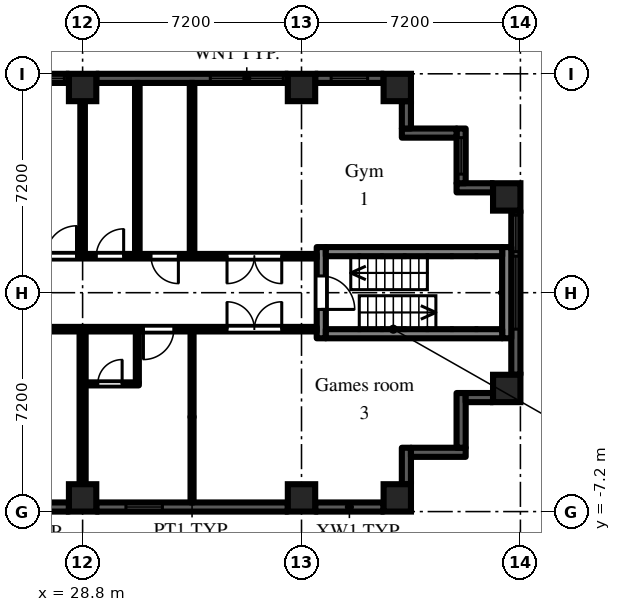
"""IFC4 building model, lengths in metres.
Left out: names, types, materials, properties, quantities, classifications, styles, units other than length and angle.
Written with IfcOpenShell. Run it as: python <this file> out.ifc"""

import sys

from ifc_helpers import new_model, si_unit, direction, frame, frame_2d, origin, origin_2d, place, context, subcontext, project, spatial, rectangle, extrude, element, fill, save


model = new_model("IFC4")
c1 = context("Model", 3, precision=1e-05, world=origin(), true_north=direction((0.0, 1.0)))
c2 = subcontext(c1, "Body", "Model", "MODEL_VIEW")
j1 = project(units=[si_unit("LENGTHUNIT", "METRE"), si_unit("PLANEANGLEUNIT", "RADIAN")], contexts=[c1])
p1 = place(None, origin())
s1 = spatial("IfcSite", under=j1, at=p1, CompositionType="ELEMENT")
p2 = place(p1, origin())
s2 = spatial("IfcBuilding", under=s1, at=p2, CompositionType="ELEMENT")
p3 = place(p2, frame((0.0, 0.0, 59.7)))
s3 = spatial("IfcBuildingStorey", under=s2, at=p3, CompositionType="ELEMENT", Elevation=59.7)
for number, where, z_axis, x_axis in (
    (1, (28.8, -6.75, 0.0), (0.0, 0.0, 1.0), (1.0, 0.0, 0.0)),
    (2, (28.8, 6.75, 0.0), (0.0, 0.0, 1.0), (1.0, 0.0, 0.0)),
    (3, (36.0, -6.75, 0.0), (0.0, 0.0, 1.0), (1.0, 0.0, 0.0)),
    (4, (36.0, 6.75, 0.0), (0.0, 0.0, 1.0), (1.0, 0.0, 0.0)),
    (5, (39.15, -6.75, 0.0), (0.0, 0.0, 1.0), (1.0, 0.0, 0.0)),
    (6, (39.15, 6.75, 0.0), (0.0, 0.0, 1.0), (1.0, 0.0, 0.0)),
    (7, (42.75, -3.15, 0.0), (0.0, 0.0, 1.0), (1.0, 0.0, 0.0)),
    (8, (42.75, 3.15, 0.0), (0.0, 0.0, 1.0), (1.0, 0.0, 0.0)),
):
    element("IfcColumn", number, at=place(p3, frame(where, z_axis=z_axis, x_axis=x_axis)), inside=s3, PredefinedType="COLUMN", context=c2, shape_type="SweptSolid", body=[
        extrude(rectangle(XDim=0.9, YDim=0.9, at=origin_2d()), origin(), (0.0, 0.0, 1.0), 3.0),
    ])
p4 = place(p3, frame((25.2, -7.05, 0.0), z_axis=(0.0, 0.0, 1.0), x_axis=(1.0, 0.0, 0.0)))
e9 = element("IfcWall", 9, at=p4, inside=s3, PredefinedType="SOLIDWALL", context=c2, shape_type="SweptSolid", body=[
    extrude(rectangle(XDim=3.15, YDim=0.3, at=frame_2d((1.575, 0.0))), origin(), (0.0, 0.0, 1.0), 2.1),
])
p5 = place(p4, frame((0.975, 0.0, 0.2)))
e10 = element("IfcOpeningElement", 10, at=p5, cuts=e9, PredefinedType="OPENING", context=c2, shape_type="SweptSolid", body=[
    extrude(rectangle(XDim=1.2, YDim=1.85, at=frame_2d((0.6, 0.925))), frame((0.0, 0.16, 0.0), z_axis=(0.0, -1.0, 0.0), x_axis=(1.0, 0.0, 0.0)), (0.0, 0.0, 1.0), 0.32),
])
p6 = place(p3, frame((29.25, -7.05, 0.0), z_axis=(0.0, 0.0, 1.0), x_axis=(1.0, 0.0, 0.0)))
e11 = element("IfcWall", 11, at=p6, inside=s3, PredefinedType="SOLIDWALL", context=c2, shape_type="SweptSolid", body=[
    extrude(rectangle(XDim=6.3, YDim=0.3, at=frame_2d((3.15, 0.0))), origin(), (0.0, 0.0, 1.0), 2.1),
])
p7 = place(p6, frame((0.975, 0.0, 0.2)))
e12 = element("IfcOpeningElement", 12, at=p7, cuts=e11, PredefinedType="OPENING", context=c2, shape_type="SweptSolid", body=[
    extrude(rectangle(XDim=1.2, YDim=1.85, at=frame_2d((0.6, 0.925))), frame((0.0, 0.16, 0.0), z_axis=(0.0, -1.0, 0.0), x_axis=(1.0, 0.0, 0.0)), (0.0, 0.0, 1.0), 0.32),
])
p8 = place(p3, frame((36.45, -7.05, 0.0), z_axis=(0.0, 0.0, 1.0), x_axis=(1.0, 0.0, 0.0)))
e13 = element("IfcWall", 13, at=p8, inside=s3, PredefinedType="SOLIDWALL", context=c2, shape_type="SweptSolid", body=[
    extrude(rectangle(XDim=2.25, YDim=0.3, at=frame_2d((1.125, 0.0))), origin(), (0.0, 0.0, 1.0), 2.1),
])
p9 = place(p3, frame((39.45, -6.3, 0.0), z_axis=(0.0, 0.0, 1.0), x_axis=(0.0, 1.0, 0.0)))
e14 = element("IfcWall", 14, at=p9, inside=s3, PredefinedType="SOLIDWALL", context=c2, shape_type="SweptSolid", body=[
    extrude(rectangle(XDim=1.2, YDim=0.3, at=frame_2d((0.6, 0.0))), origin(), (0.0, 0.0, 1.0), 2.55),
])
p10 = place(p3, frame((39.6, -5.25, 0.0), z_axis=(0.0, 0.0, 1.0), x_axis=(1.0, 0.0, 0.0)))
e15 = element("IfcWall", 15, at=p10, inside=s3, PredefinedType="SOLIDWALL", context=c2, shape_type="SweptSolid", body=[
    extrude(rectangle(XDim=1.8, YDim=0.3, at=frame_2d((0.9, 0.0))), origin(), (0.0, 0.0, 1.0), 2.55),
])
p11 = place(p3, frame((41.25, -5.1, 0.0), z_axis=(0.0, 0.0, 1.0), x_axis=(0.0, 1.0, 0.0)))
e16 = element("IfcWall", 16, at=p11, inside=s3, PredefinedType="SOLIDWALL", context=c2, shape_type="SweptSolid", body=[
    extrude(rectangle(XDim=1.8, YDim=0.3, at=frame_2d((0.9, 0.0))), origin(), (0.0, 0.0, 1.0), 2.55),
])
p12 = place(p3, frame((41.4, -3.45, 0.0), z_axis=(0.0, 0.0, 1.0), x_axis=(1.0, 0.0, 0.0)))
e17 = element("IfcWall", 17, at=p12, inside=s3, PredefinedType="SOLIDWALL", context=c2, shape_type="SweptSolid", body=[
    extrude(rectangle(XDim=0.9, YDim=0.3, at=frame_2d((0.45, 0.0))), origin(), (0.0, 0.0, 1.0), 2.55),
])
p13 = place(p3, frame((43.05, -2.7, 0.0), z_axis=(0.0, 0.0, 1.0), x_axis=(0.0, 1.0, 0.0)))
e18 = element("IfcWall", 18, at=p13, inside=s3, PredefinedType="SOLIDWALL", context=c2, shape_type="SweptSolid", body=[
    extrude(rectangle(XDim=5.4, YDim=0.3, at=frame_2d((2.7, 0.0))), origin(), (0.0, 0.0, 1.0), 2.1),
])
p14 = place(p13, frame((1.5, 0.0, 0.2)))
e19 = element("IfcOpeningElement", 19, at=p14, cuts=e18, PredefinedType="OPENING", context=c2, shape_type="SweptSolid", body=[
    extrude(rectangle(XDim=2.4, YDim=1.85, at=frame_2d((1.2, 0.925))), frame((0.0, 0.16, 0.0), z_axis=(0.0, -1.0, 0.0), x_axis=(1.0, 0.0, 0.0)), (0.0, 0.0, 1.0), 0.32),
])
p15 = place(p13, frame((4.05, 0.0, 0.2)))
e20 = element("IfcOpeningElement", 20, at=p15, cuts=e18, PredefinedType="OPENING", context=c2, shape_type="SweptSolid", body=[
    extrude(rectangle(XDim=1.2, YDim=1.85, at=frame_2d((0.6, 0.925))), frame((0.0, 0.16, 0.0), z_axis=(0.0, -1.0, 0.0), x_axis=(1.0, 0.0, 0.0)), (0.0, 0.0, 1.0), 0.32),
])
p16 = place(p3, frame((42.3, 3.45, 0.0), z_axis=(0.0, 0.0, 1.0), x_axis=(-1.0, 0.0, 0.0)))
e21 = element("IfcWall", 21, at=p16, inside=s3, PredefinedType="SOLIDWALL", context=c2, shape_type="SweptSolid", body=[
    extrude(rectangle(XDim=1.2, YDim=0.3, at=frame_2d((0.6, 0.0))), origin(), (0.0, 0.0, 1.0), 2.55),
])
p17 = place(p3, frame((41.25, 3.6, 0.0), z_axis=(0.0, 0.0, 1.0), x_axis=(0.0, 1.0, 0.0)))
e22 = element("IfcWall", 22, at=p17, inside=s3, PredefinedType="SOLIDWALL", context=c2, shape_type="SweptSolid", body=[
    extrude(rectangle(XDim=1.8, YDim=0.3, at=frame_2d((0.9, 0.0))), origin(), (0.0, 0.0, 1.0), 2.55),
])
p18 = place(p17, frame((0.3, 0.0, 0.2)))
e23 = element("IfcOpeningElement", 23, at=p18, cuts=e22, PredefinedType="OPENING", context=c2, shape_type="SweptSolid", body=[
    extrude(rectangle(XDim=1.2, YDim=1.85, at=frame_2d((0.6, 0.925))), frame((0.0, 0.16, 0.0), z_axis=(0.0, -1.0, 0.0), x_axis=(1.0, 0.0, 0.0)), (0.0, 0.0, 1.0), 0.32),
])
p19 = place(p3, frame((41.1, 5.25, 0.0), z_axis=(0.0, 0.0, 1.0), x_axis=(-1.0, 0.0, 0.0)))
e24 = element("IfcWall", 24, at=p19, inside=s3, PredefinedType="SOLIDWALL", context=c2, shape_type="SweptSolid", body=[
    extrude(rectangle(XDim=1.8, YDim=0.3, at=frame_2d((0.9, 0.0))), origin(), (0.0, 0.0, 1.0), 2.55),
])
p20 = place(p3, frame((39.45, 5.4, 0.0), z_axis=(0.0, 0.0, 1.0), x_axis=(0.0, 1.0, 0.0)))
e25 = element("IfcWall", 25, at=p20, inside=s3, PredefinedType="SOLIDWALL", context=c2, shape_type="SweptSolid", body=[
    extrude(rectangle(XDim=0.9, YDim=0.3, at=frame_2d((0.45, 0.0))), origin(), (0.0, 0.0, 1.0), 2.55),
])
p21 = place(p3, frame((38.7, 7.05, 0.0), z_axis=(0.0, 0.0, 1.0), x_axis=(-1.0, 0.0, 0.0)))
e26 = element("IfcWall", 26, at=p21, inside=s3, PredefinedType="SOLIDWALL", context=c2, shape_type="SweptSolid", body=[
    extrude(rectangle(XDim=2.25, YDim=0.3, at=frame_2d((1.125, 0.0))), origin(), (0.0, 0.0, 1.0), 2.1),
])
p22 = place(p21, frame((0.525, 0.0, 0.2)))
e27 = element("IfcOpeningElement", 27, at=p22, cuts=e26, PredefinedType="OPENING", context=c2, shape_type="SweptSolid", body=[
    extrude(rectangle(XDim=1.2, YDim=1.85, at=frame_2d((0.6, 0.925))), frame((0.0, 0.16, 0.0), z_axis=(0.0, -1.0, 0.0), x_axis=(1.0, 0.0, 0.0)), (0.0, 0.0, 1.0), 0.32),
])
p23 = place(p3, frame((35.55, 7.05, 0.0), z_axis=(0.0, 0.0, 1.0), x_axis=(-1.0, 0.0, 0.0)))
e28 = element("IfcWall", 28, at=p23, inside=s3, PredefinedType="SOLIDWALL", context=c2, shape_type="SweptSolid", body=[
    extrude(rectangle(XDim=6.3, YDim=0.3, at=frame_2d((3.15, 0.0))), origin(), (0.0, 0.0, 1.0), 2.1),
])
p24 = place(p23, frame((0.15, 0.0, 0.2)))
e29 = element("IfcOpeningElement", 29, at=p24, cuts=e28, PredefinedType="OPENING", context=c2, shape_type="SweptSolid", body=[
    extrude(rectangle(XDim=2.4, YDim=1.85, at=frame_2d((1.2, 0.925))), frame((0.0, 0.16, 0.0), z_axis=(0.0, -1.0, 0.0), x_axis=(1.0, 0.0, 0.0)), (0.0, 0.0, 1.0), 0.32),
])
p25 = place(p3, frame((28.35, 7.05, 0.0), z_axis=(0.0, 0.0, 1.0), x_axis=(-1.0, 0.0, 0.0)))
e30 = element("IfcWall", 30, at=p25, inside=s3, PredefinedType="SOLIDWALL", context=c2, shape_type="SweptSolid", body=[
    extrude(rectangle(XDim=3.15, YDim=0.3, at=frame_2d((1.575, 0.0))), origin(), (0.0, 0.0, 1.0), 2.1),
])
p26 = place(p25, frame((0.15, 0.0, 0.2)))
e31 = element("IfcOpeningElement", 31, at=p26, cuts=e30, PredefinedType="OPENING", context=c2, shape_type="SweptSolid", body=[
    extrude(rectangle(XDim=2.4, YDim=1.85, at=frame_2d((1.2, 0.925))), frame((0.0, 0.16, 0.0), z_axis=(0.0, -1.0, 0.0), x_axis=(1.0, 0.0, 0.0)), (0.0, 0.0, 1.0), 0.32),
])
p27 = place(p3, frame((36.65, -1.5, 0.0), z_axis=(0.0, 0.0, 1.0), x_axis=(0.0, 1.0, 0.0)))
e32 = element("IfcWall", 32, at=p27, inside=s3, PredefinedType="SHEAR", context=c2, shape_type="SweptSolid", body=[
    extrude(rectangle(XDim=3.0, YDim=0.3, at=frame_2d((1.5, 0.0))), origin(), (0.0, 0.0, 1.0), 2.55),
])
p28 = place(p27, frame((0.95, 0.0, 0.0)))
e33 = element("IfcOpeningElement", 33, at=p28, cuts=e32, PredefinedType="OPENING", context=c2, shape_type="SweptSolid", body=[
    extrude(rectangle(XDim=1.1, YDim=2.1, at=frame_2d((0.55, 1.05))), frame((0.0, 0.16, 0.0), z_axis=(0.0, -1.0, 0.0), x_axis=(1.0, 0.0, 0.0)), (0.0, 0.0, 1.0), 0.32),
])
p29 = place(p3, frame((42.75, -1.5, 0.0), z_axis=(0.0, 0.0, 1.0), x_axis=(0.0, 1.0, 0.0)))
e34 = element("IfcWall", 34, at=p29, inside=s3, PredefinedType="SHEAR", context=c2, shape_type="SweptSolid", body=[
    extrude(rectangle(XDim=3.0, YDim=0.3, at=frame_2d((1.5, 0.0))), origin(), (0.0, 0.0, 1.0), 2.55),
])
for number, where, z_axis, x_axis in (
    (35, (36.8, -1.35, 0.0), (0.0, 0.0, 1.0), (1.0, 0.0, 0.0)),
    (36, (36.8, 1.35, 0.0), (0.0, 0.0, 1.0), (1.0, 0.0, 0.0)),
):
    element("IfcWall", number, at=place(p3, frame(where, z_axis=z_axis, x_axis=x_axis)), inside=s3, PredefinedType="SHEAR", context=c2, shape_type="SweptSolid", body=[
        extrude(rectangle(XDim=5.8, YDim=0.3, at=frame_2d((2.9, 0.0))), origin(), (0.0, 0.0, 1.0), 2.55),
    ])
p30 = place(p3, frame((21.6, -1.2, 0.0), z_axis=(0.0, 0.0, 1.0), x_axis=(1.0, 0.0, 0.0)))
e37 = element("IfcWall", 37, at=p30, inside=s3, PredefinedType="PARTITIONING", context=c2, shape_type="SweptSolid", body=[
    extrude(rectangle(XDim=14.9, YDim=0.15, at=frame_2d((7.45, 0.0))), origin(), (0.0, 0.0, 1.0), 2.55),
])
p31 = place(p30, frame((3.8, 0.0, 0.0)))
e38 = element("IfcOpeningElement", 38, at=p31, cuts=e37, PredefinedType="OPENING", context=c2, shape_type="SweptSolid", body=[
    extrude(rectangle(XDim=1.0, YDim=2.1, at=frame_2d((0.5, 1.05))), frame((0.0, 0.085, 0.0), z_axis=(0.0, -1.0, 0.0), x_axis=(1.0, 0.0, 0.0)), (0.0, 0.0, 1.0), 0.17),
])
p32 = place(p30, frame((9.2, 0.0, 0.0)))
e39 = element("IfcOpeningElement", 39, at=p32, cuts=e37, PredefinedType="OPENING", context=c2, shape_type="SweptSolid", body=[
    extrude(rectangle(XDim=1.0, YDim=2.1, at=frame_2d((0.5, 1.05))), frame((0.0, 0.085, 0.0), z_axis=(0.0, -1.0, 0.0), x_axis=(1.0, 0.0, 0.0)), (0.0, 0.0, 1.0), 0.17),
])
p33 = place(p30, frame((11.95, 0.0, 0.0)))
e40 = element("IfcOpeningElement", 40, at=p33, cuts=e37, PredefinedType="OPENING", context=c2, shape_type="SweptSolid", body=[
    extrude(rectangle(XDim=1.8, YDim=2.1, at=frame_2d((0.9, 1.05))), frame((0.0, 0.085, 0.0), z_axis=(0.0, -1.0, 0.0), x_axis=(1.0, 0.0, 0.0)), (0.0, 0.0, 1.0), 0.17),
])
p34 = place(p3, frame((21.6, 1.2, 0.0), z_axis=(0.0, 0.0, 1.0), x_axis=(1.0, 0.0, 0.0)))
e41 = element("IfcWall", 41, at=p34, inside=s3, PredefinedType="PARTITIONING", context=c2, shape_type="SweptSolid", body=[
    extrude(rectangle(XDim=14.9, YDim=0.15, at=frame_2d((7.45, 0.0))), origin(), (0.0, 0.0, 1.0), 2.55),
])
p35 = place(p34, frame((6.0, 0.0, 0.0)))
e42 = element("IfcOpeningElement", 42, at=p35, cuts=e41, PredefinedType="OPENING", context=c2, shape_type="SweptSolid", body=[
    extrude(rectangle(XDim=1.0, YDim=2.1, at=frame_2d((0.5, 1.05))), frame((0.0, 0.085, 0.0), z_axis=(0.0, -1.0, 0.0), x_axis=(1.0, 0.0, 0.0)), (0.0, 0.0, 1.0), 0.17),
])
p36 = place(p34, frame((7.65, 0.0, 0.0)))
e43 = element("IfcOpeningElement", 43, at=p36, cuts=e41, PredefinedType="OPENING", context=c2, shape_type="SweptSolid", body=[
    extrude(rectangle(XDim=0.9, YDim=2.1, at=frame_2d((0.45, 1.05))), frame((0.0, 0.085, 0.0), z_axis=(0.0, -1.0, 0.0), x_axis=(1.0, 0.0, 0.0)), (0.0, 0.0, 1.0), 0.17),
])
p37 = place(p34, frame((9.45, 0.0, 0.0)))
e44 = element("IfcOpeningElement", 44, at=p37, cuts=e41, PredefinedType="OPENING", context=c2, shape_type="SweptSolid", body=[
    extrude(rectangle(XDim=0.9, YDim=2.1, at=frame_2d((0.45, 1.05))), frame((0.0, 0.085, 0.0), z_axis=(0.0, -1.0, 0.0), x_axis=(1.0, 0.0, 0.0)), (0.0, 0.0, 1.0), 0.17),
])
p38 = place(p34, frame((11.95, 0.0, 0.0)))
e45 = element("IfcOpeningElement", 45, at=p38, cuts=e41, PredefinedType="OPENING", context=c2, shape_type="SweptSolid", body=[
    extrude(rectangle(XDim=1.8, YDim=2.1, at=frame_2d((0.9, 1.05))), frame((0.0, 0.085, 0.0), z_axis=(0.0, -1.0, 0.0), x_axis=(1.0, 0.0, 0.0)), (0.0, 0.0, 1.0), 0.17),
])
p39 = place(p3, frame((28.8, -6.9, 0.0), z_axis=(0.0, 0.0, 1.0), x_axis=(0.0, 1.0, 0.0)))
e46 = element("IfcWall", 46, at=p39, inside=s3, PredefinedType="PARTITIONING", context=c2, shape_type="SweptSolid", body=[
    extrude(rectangle(XDim=5.625, YDim=0.2, at=frame_2d((2.812, 0.0))), origin(), (0.0, 0.0, 1.0), 2.55),
])
p40 = place(p3, frame((28.9, -3.0, 0.0), z_axis=(0.0, 0.0, 1.0), x_axis=(1.0, 0.0, 0.0)))
e47 = element("IfcWall", 47, at=p40, inside=s3, PredefinedType="PARTITIONING", context=c2, shape_type="SweptSolid", body=[
    extrude(rectangle(XDim=1.75, YDim=0.1, at=frame_2d((0.875, 0.0))), origin(), (0.0, 0.0, 1.0), 2.55),
])
p41 = place(p40, frame((0.4, 0.0, 0.0)))
e48 = element("IfcOpeningElement", 48, at=p41, cuts=e47, PredefinedType="OPENING", context=c2, shape_type="SweptSolid", body=[
    extrude(rectangle(XDim=0.8, YDim=2.1, at=frame_2d((0.4, 1.05))), frame((0.0, 0.06, 0.0), z_axis=(0.0, -1.0, 0.0), x_axis=(1.0, 0.0, 0.0)), (0.0, 0.0, 1.0), 0.12),
])
p42 = place(p3, frame((28.8, 1.275, 0.0), z_axis=(0.0, 0.0, 1.0), x_axis=(0.0, 1.0, 0.0)))
e49 = element("IfcWall", 49, at=p42, inside=s3, PredefinedType="PARTITIONING", context=c2, shape_type="SweptSolid", body=[
    extrude(rectangle(XDim=5.625, YDim=0.15, at=frame_2d((2.812, 0.0))), origin(), (0.0, 0.0, 1.0), 2.55),
])
p43 = place(p3, frame((30.6, -2.95, 0.0), z_axis=(0.0, 0.0, 1.0), x_axis=(0.0, 1.0, 0.0)))
e50 = element("IfcWall", 50, at=p43, inside=s3, PredefinedType="PARTITIONING", context=c2, shape_type="SweptSolid", body=[
    extrude(rectangle(XDim=1.675, YDim=0.1, at=frame_2d((0.837, 0.0))), origin(), (0.0, 0.0, 1.0), 2.55),
])
p44 = place(p3, frame((30.6, 1.275, 0.0), z_axis=(0.0, 0.0, 1.0), x_axis=(0.0, 1.0, 0.0)))
e51 = element("IfcWall", 51, at=p44, inside=s3, PredefinedType="PARTITIONING", context=c2, shape_type="SweptSolid", body=[
    extrude(rectangle(XDim=5.625, YDim=0.15, at=frame_2d((2.812, 0.0))), origin(), (0.0, 0.0, 1.0), 2.55),
])
p45 = place(p3, frame((32.4, -6.9, 0.0), z_axis=(0.0, 0.0, 1.0), x_axis=(0.0, 1.0, 0.0)))
e52 = element("IfcWall", 52, at=p45, inside=s3, PredefinedType="PARTITIONING", context=c2, shape_type="SweptSolid", body=[
    extrude(rectangle(XDim=5.625, YDim=0.1, at=frame_2d((2.812, 0.0))), origin(), (0.0, 0.0, 1.0), 2.55),
])
p46 = place(p3, frame((32.4, 1.275, 0.0), z_axis=(0.0, 0.0, 1.0), x_axis=(0.0, 1.0, 0.0)))
e53 = element("IfcWall", 53, at=p46, inside=s3, PredefinedType="PARTITIONING", context=c2, shape_type="SweptSolid", body=[
    extrude(rectangle(XDim=5.625, YDim=0.15, at=frame_2d((2.812, 0.0))), origin(), (0.0, 0.0, 1.0), 2.55),
])
p47 = place(p7, origin())
e54 = element("IfcWindow", 54, at=p47, inside=s3, PartitioningType="SINGLE_PANEL", PredefinedType="WINDOW", context=c2, shape_type="SweptSolid", body=[
    extrude(rectangle(XDim=1.2, YDim=1.85, at=frame_2d((0.6, 0.925))), frame((0.0, 0.03, 0.0), z_axis=(0.0, -1.0, 0.0), x_axis=(1.0, 0.0, 0.0)), (0.0, 0.0, 1.0), 0.06),
])
fill(e12, e54)
p48 = place(p14, origin())
e55 = element("IfcWindow", 55, at=p48, inside=s3, PartitioningType="SINGLE_PANEL", PredefinedType="WINDOW", context=c2, shape_type="SweptSolid", body=[
    extrude(rectangle(XDim=2.4, YDim=1.85, at=frame_2d((1.2, 0.925))), frame((0.0, 0.03, 0.0), z_axis=(0.0, -1.0, 0.0), x_axis=(1.0, 0.0, 0.0)), (0.0, 0.0, 1.0), 0.06),
])
fill(e19, e55)
p49 = place(p15, origin())
e56 = element("IfcWindow", 56, at=p49, inside=s3, PartitioningType="SINGLE_PANEL", PredefinedType="WINDOW", context=c2, shape_type="SweptSolid", body=[
    extrude(rectangle(XDim=1.2, YDim=1.85, at=frame_2d((0.6, 0.925))), frame((0.0, 0.03, 0.0), z_axis=(0.0, -1.0, 0.0), x_axis=(1.0, 0.0, 0.0)), (0.0, 0.0, 1.0), 0.06),
])
fill(e20, e56)
p50 = place(p18, origin())
e57 = element("IfcWindow", 57, at=p50, inside=s3, PartitioningType="SINGLE_PANEL", PredefinedType="WINDOW", context=c2, shape_type="SweptSolid", body=[
    extrude(rectangle(XDim=1.2, YDim=1.85, at=frame_2d((0.6, 0.925))), frame((0.0, 0.03, 0.0), z_axis=(0.0, -1.0, 0.0), x_axis=(1.0, 0.0, 0.0)), (0.0, 0.0, 1.0), 0.06),
])
fill(e23, e57)
p51 = place(p22, origin())
e58 = element("IfcWindow", 58, at=p51, inside=s3, PartitioningType="SINGLE_PANEL", PredefinedType="WINDOW", context=c2, shape_type="SweptSolid", body=[
    extrude(rectangle(XDim=1.2, YDim=1.85, at=frame_2d((0.6, 0.925))), frame((0.0, 0.03, 0.0), z_axis=(0.0, -1.0, 0.0), x_axis=(1.0, 0.0, 0.0)), (0.0, 0.0, 1.0), 0.06),
])
fill(e27, e58)
p52 = place(p24, origin())
e59 = element("IfcWindow", 59, at=p52, inside=s3, PartitioningType="SINGLE_PANEL", PredefinedType="WINDOW", context=c2, shape_type="SweptSolid", body=[
    extrude(rectangle(XDim=2.4, YDim=1.85, at=frame_2d((1.2, 0.925))), frame((0.0, 0.03, 0.0), z_axis=(0.0, -1.0, 0.0), x_axis=(1.0, 0.0, 0.0)), (0.0, 0.0, 1.0), 0.06),
])
fill(e29, e59)
p53 = place(p26, origin())
e60 = element("IfcWindow", 60, at=p53, inside=s3, PartitioningType="SINGLE_PANEL", PredefinedType="WINDOW", context=c2, shape_type="SweptSolid", body=[
    extrude(rectangle(XDim=2.4, YDim=1.85, at=frame_2d((1.2, 0.925))), frame((0.0, 0.03, 0.0), z_axis=(0.0, -1.0, 0.0), x_axis=(1.0, 0.0, 0.0)), (0.0, 0.0, 1.0), 0.06),
])
fill(e31, e60)
p54 = place(p28, frame((1.1, 0.0, 0.0), z_axis=(0.0, 0.0, 1.0), x_axis=(-1.0, 0.0, 0.0)))
e61 = element("IfcDoor", 61, at=p54, inside=s3, OperationType="SINGLE_SWING_RIGHT", PredefinedType="DOOR", context=c2, shape_type="SweptSolid", body=[
    extrude(rectangle(XDim=1.1, YDim=2.1, at=frame_2d((0.55, 1.05))), frame((0.0, 0.025, 0.0), z_axis=(0.0, -1.0, 0.0), x_axis=(1.0, 0.0, 0.0)), (0.0, 0.0, 1.0), 0.05),
])
fill(e33, e61)
p55 = place(p35, origin())
e62 = element("IfcDoor", 62, at=p55, inside=s3, OperationType="SINGLE_SWING_RIGHT", PredefinedType="DOOR", context=c2, shape_type="SweptSolid", body=[
    extrude(rectangle(XDim=1.0, YDim=2.1, at=frame_2d((0.5, 1.05))), frame((0.0, 0.025, 0.0), z_axis=(0.0, -1.0, 0.0), x_axis=(1.0, 0.0, 0.0)), (0.0, 0.0, 1.0), 0.05),
])
fill(e42, e62)
p56 = place(p36, origin())
e63 = element("IfcDoor", 63, at=p56, inside=s3, OperationType="SINGLE_SWING_RIGHT", PredefinedType="DOOR", context=c2, shape_type="SweptSolid", body=[
    extrude(rectangle(XDim=0.9, YDim=2.1, at=frame_2d((0.45, 1.05))), frame((0.0, 0.025, 0.0), z_axis=(0.0, -1.0, 0.0), x_axis=(1.0, 0.0, 0.0)), (0.0, 0.0, 1.0), 0.05),
])
fill(e43, e63)
p57 = place(p37, frame((0.9, 0.0, 0.0), z_axis=(0.0, 0.0, 1.0), x_axis=(-1.0, 0.0, 0.0)))
e64 = element("IfcDoor", 64, at=p57, inside=s3, OperationType="SINGLE_SWING_LEFT", PredefinedType="DOOR", context=c2, shape_type="SweptSolid", body=[
    extrude(rectangle(XDim=0.9, YDim=2.1, at=frame_2d((0.45, 1.05))), frame((0.0, 0.025, 0.0), z_axis=(0.0, -1.0, 0.0), x_axis=(1.0, 0.0, 0.0)), (0.0, 0.0, 1.0), 0.05),
])
fill(e44, e64)
p58 = place(p38, frame((1.8, 0.0, 0.0), z_axis=(0.0, 0.0, 1.0), x_axis=(-1.0, 0.0, 0.0)))
e65 = element("IfcDoor", 65, at=p58, inside=s3, OperationType="DOUBLE_DOOR_DOUBLE_SWING", PredefinedType="DOOR", context=c2, shape_type="SweptSolid", body=[
    extrude(rectangle(XDim=1.8, YDim=2.1, at=frame_2d((0.9, 1.05))), frame((0.0, 0.025, 0.0), z_axis=(0.0, -1.0, 0.0), x_axis=(1.0, 0.0, 0.0)), (0.0, 0.0, 1.0), 0.05),
])
fill(e45, e65)
p59 = place(p41, origin())
e66 = element("IfcDoor", 66, at=p59, inside=s3, OperationType="SINGLE_SWING_RIGHT", PredefinedType="DOOR", context=c2, shape_type="SweptSolid", body=[
    extrude(rectangle(XDim=0.8, YDim=2.1, at=frame_2d((0.4, 1.05))), frame((0.0, 0.025, 0.0), z_axis=(0.0, -1.0, 0.0), x_axis=(1.0, 0.0, 0.0)), (0.0, 0.0, 1.0), 0.05),
])
fill(e48, e66)
p60 = place(p32, frame((1.0, 0.0, 0.0), z_axis=(0.0, 0.0, 1.0), x_axis=(-1.0, 0.0, 0.0)))
e67 = element("IfcDoor", 67, at=p60, inside=s3, OperationType="SINGLE_SWING_RIGHT", PredefinedType="DOOR", context=c2, shape_type="SweptSolid", body=[
    extrude(rectangle(XDim=1.0, YDim=2.1, at=frame_2d((0.5, 1.05))), frame((0.0, 0.025, 0.0), z_axis=(0.0, -1.0, 0.0), x_axis=(1.0, 0.0, 0.0)), (0.0, 0.0, 1.0), 0.05),
])
fill(e39, e67)
p61 = place(p33, origin())
e68 = element("IfcDoor", 68, at=p61, inside=s3, OperationType="DOUBLE_DOOR_DOUBLE_SWING", PredefinedType="DOOR", context=c2, shape_type="SweptSolid", body=[
    extrude(rectangle(XDim=1.8, YDim=2.1, at=frame_2d((0.9, 1.05))), frame((0.0, 0.025, 0.0), z_axis=(0.0, -1.0, 0.0), x_axis=(1.0, 0.0, 0.0)), (0.0, 0.0, 1.0), 0.05),
])
fill(e40, e68)
save(model, sys.argv[1])
